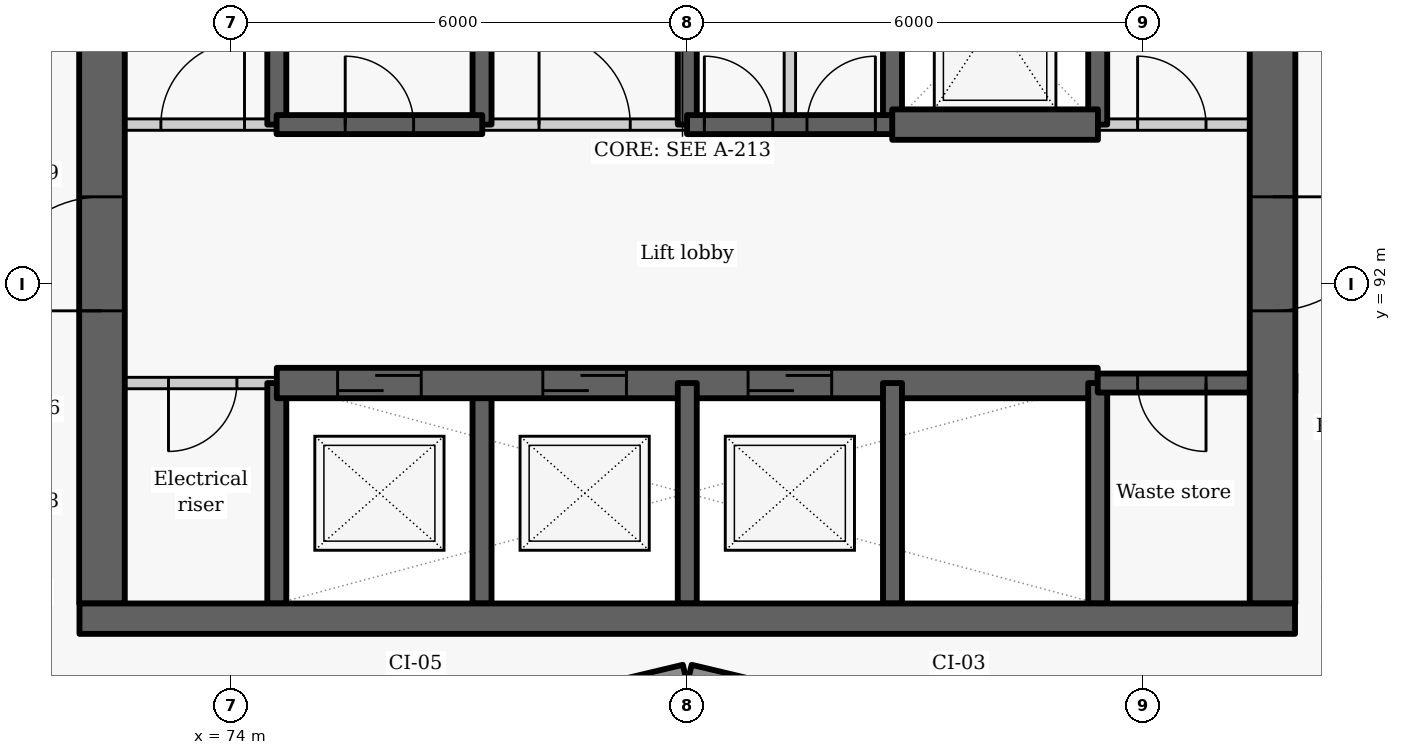
"""IFC4 building model, lengths in metres.
Left out: names, types, materials, properties, quantities, classifications, styles, units other than length and angle.
Written with IfcOpenShell. Run it as: python <this file> out.ifc"""

import sys

from ifc_helpers import new_model, si_unit, direction, frame, frame_2d, origin, place, context, subcontext, project, spatial, rectangle, extrude, element, fill, save


model = new_model("IFC4")
c1 = context("Model", 3, precision=1e-05, world=origin(), true_north=direction((0.0, 1.0)))
c2 = subcontext(c1, "Body", "Model", "MODEL_VIEW")
j1 = project(units=[si_unit("LENGTHUNIT", "METRE"), si_unit("PLANEANGLEUNIT", "RADIAN")], contexts=[c1])
p1 = place(None, origin())
s1 = spatial("IfcSite", under=j1, at=p1, CompositionType="ELEMENT")
p2 = place(p1, origin())
s2 = spatial("IfcBuilding", under=s1, at=p2, CompositionType="ELEMENT")
p3 = place(p2, frame((0.0, 0.0, 61.2)))
s3 = spatial("IfcBuildingStorey", under=s2, at=p3, CompositionType="ELEMENT", Elevation=61.2)
for number, where, z_axis, x_axis in (
    (1, (76.814, 86.119, 0.0), (0.0, 0.0, 1.0), (0.973, 0.232, 0.0)),
    (2, (80.029, 86.872, 0.0), (0.0, 0.0, 1.0), (0.973, -0.232, 0.0)),
):
    element("IfcWall", number, at=place(p3, frame(where, z_axis=z_axis, x_axis=x_axis)), inside=s3, PredefinedType="SOLIDWALL", context=c2, shape_type="SweptSolid", body=[
        extrude(rectangle(XDim=3.246, YDim=0.25, at=frame_2d((1.623, 0.0))), origin(), (0.0, 0.0, 1.0), 2.425),
    ])
p4 = place(p3, frame((74.6, 87.8, -0.275), z_axis=(0.0, 0.0, 1.0), x_axis=(0.0, 1.0, 0.0)))
e3 = element("IfcWall", 3, at=p4, inside=s3, PredefinedType="SHEAR", context=c2, shape_type="SweptSolid", body=[
    extrude(rectangle(XDim=2.9, YDim=0.25, at=frame_2d((1.45, 0.0))), origin(), (0.0, 0.0, 1.0), 3.3),
])
p5 = place(p3, frame((74.6, 94.1, -0.275), z_axis=(0.0, 0.0, 1.0), x_axis=(0.0, 1.0, 0.0)))
e4 = element("IfcWall", 4, at=p5, inside=s3, PredefinedType="SHEAR", context=c2, shape_type="SweptSolid", body=[
    extrude(rectangle(XDim=2.8, YDim=0.25, at=frame_2d((1.4, 0.0))), origin(), (0.0, 0.0, 1.0), 3.3),
])
p6 = place(p3, frame((74.6, 90.7, 0.0), z_axis=(0.0, 0.0, 1.0), x_axis=(-1.0, 0.0, 0.0)))
e5 = element("IfcWall", 5, at=p6, inside=s3, PredefinedType="PARTITIONING", context=c2, shape_type="SweptSolid", body=[
    extrude(rectangle(XDim=2.6, YDim=0.15, at=frame_2d((1.3, 0.0))), origin(), (0.0, 0.0, 1.0), 3.025),
])
p7 = place(p6, frame((0.525, 0.0, 0.0)))
e6 = element("IfcOpeningElement", 6, at=p7, cuts=e5, PredefinedType="OPENING", context=c2, shape_type="SweptSolid", body=[
    extrude(rectangle(XDim=0.9, YDim=2.1, at=frame_2d((0.45, 1.05))), frame((0.0, 0.085, 0.0), z_axis=(0.0, -1.0, 0.0), x_axis=(1.0, 0.0, 0.0)), (0.0, 0.0, 1.0), 0.17),
])
p8 = place(p3, frame((72.3, 87.8, -0.275), z_axis=(0.0, 0.0, 1.0), x_axis=(0.0, 1.0, 0.0)))
e7 = element("IfcWall", 7, at=p8, inside=s3, PredefinedType="SHEAR", context=c2, shape_type="SweptSolid", body=[
    extrude(rectangle(XDim=9.1, YDim=0.6, at=frame_2d((4.55, 0.0))), origin(), (0.0, 0.0, 1.0), 3.3),
])
p9 = place(p8, frame((3.85, 0.0, 0.275)))
e8 = element("IfcOpeningElement", 8, at=p9, cuts=e7, PredefinedType="OPENING", context=c2, shape_type="SweptSolid", body=[
    extrude(rectangle(XDim=1.5, YDim=2.1, at=frame_2d((0.75, 1.05))), frame((0.0, 0.31, 0.0), z_axis=(0.0, -1.0, 0.0), x_axis=(1.0, 0.0, 0.0)), (0.0, 0.0, 1.0), 0.62),
])
p10 = place(p3, frame((77.3, 87.8, -0.275), z_axis=(0.0, 0.0, 1.0), x_axis=(0.0, 1.0, 0.0)))
e9 = element("IfcWall", 9, at=p10, inside=s3, PredefinedType="SHEAR", context=c2, shape_type="SweptSolid", body=[
    extrude(rectangle(XDim=2.9, YDim=0.25, at=frame_2d((1.45, 0.0))), origin(), (0.0, 0.0, 1.0), 3.3),
])
p11 = place(p3, frame((77.3, 94.1, -0.275), z_axis=(0.0, 0.0, 1.0), x_axis=(0.0, 1.0, 0.0)))
e10 = element("IfcWall", 10, at=p11, inside=s3, PredefinedType="SHEAR", context=c2, shape_type="SweptSolid", body=[
    extrude(rectangle(XDim=2.8, YDim=0.25, at=frame_2d((1.4, 0.0))), origin(), (0.0, 0.0, 1.0), 3.3),
])
p12 = place(p3, frame((74.6, 90.7, -0.275), z_axis=(0.0, 0.0, 1.0), x_axis=(1.0, 0.0, 0.0)))
e11 = element("IfcWall", 11, at=p12, inside=s3, PredefinedType="SHEAR", context=c2, shape_type="SweptSolid", body=[
    extrude(rectangle(XDim=10.8, YDim=0.4, at=frame_2d((5.4, 0.0))), origin(), (0.0, 0.0, 1.0), 3.3),
])
p13 = place(p12, frame((0.8, 0.0, 0.275)))
e12 = element("IfcOpeningElement", 12, at=p13, cuts=e11, PredefinedType="OPENING", context=c2, shape_type="SweptSolid", body=[
    extrude(rectangle(XDim=1.1, YDim=2.1, at=frame_2d((0.55, 1.05))), frame((0.0, 0.21, 0.0), z_axis=(0.0, -1.0, 0.0), x_axis=(1.0, 0.0, 0.0)), (0.0, 0.0, 1.0), 0.42),
])
p14 = place(p12, frame((3.5, 0.0, 0.275)))
e13 = element("IfcOpeningElement", 13, at=p14, cuts=e11, PredefinedType="OPENING", context=c2, shape_type="SweptSolid", body=[
    extrude(rectangle(XDim=1.1, YDim=2.1, at=frame_2d((0.55, 1.05))), frame((0.0, 0.21, 0.0), z_axis=(0.0, -1.0, 0.0), x_axis=(1.0, 0.0, 0.0)), (0.0, 0.0, 1.0), 0.42),
])
p15 = place(p12, frame((6.2, 0.0, 0.275)))
e14 = element("IfcOpeningElement", 14, at=p15, cuts=e11, PredefinedType="OPENING", context=c2, shape_type="SweptSolid", body=[
    extrude(rectangle(XDim=1.1, YDim=2.1, at=frame_2d((0.55, 1.05))), frame((0.0, 0.21, 0.0), z_axis=(0.0, -1.0, 0.0), x_axis=(1.0, 0.0, 0.0)), (0.0, 0.0, 1.0), 0.42),
])
p16 = place(p3, frame((80.0, 87.8, -0.275), z_axis=(0.0, 0.0, 1.0), x_axis=(0.0, 1.0, 0.0)))
e15 = element("IfcWall", 15, at=p16, inside=s3, PredefinedType="SHEAR", context=c2, shape_type="SweptSolid", body=[
    extrude(rectangle(XDim=2.9, YDim=0.25, at=frame_2d((1.45, 0.0))), origin(), (0.0, 0.0, 1.0), 3.3),
])
p17 = place(p3, frame((80.0, 94.1, -0.275), z_axis=(0.0, 0.0, 1.0), x_axis=(0.0, 1.0, 0.0)))
e16 = element("IfcWall", 16, at=p17, inside=s3, PredefinedType="SHEAR", context=c2, shape_type="SweptSolid", body=[
    extrude(rectangle(XDim=2.8, YDim=0.25, at=frame_2d((1.4, 0.0))), origin(), (0.0, 0.0, 1.0), 3.3),
])
p18 = place(p3, frame((82.7, 87.8, -0.275), z_axis=(0.0, 0.0, 1.0), x_axis=(0.0, 1.0, 0.0)))
e17 = element("IfcWall", 17, at=p18, inside=s3, PredefinedType="SHEAR", context=c2, shape_type="SweptSolid", body=[
    extrude(rectangle(XDim=2.9, YDim=0.25, at=frame_2d((1.45, 0.0))), origin(), (0.0, 0.0, 1.0), 3.3),
])
p19 = place(p3, frame((82.7, 94.1, -0.275), z_axis=(0.0, 0.0, 1.0), x_axis=(0.0, 1.0, 0.0)))
e18 = element("IfcWall", 18, at=p19, inside=s3, PredefinedType="SHEAR", context=c2, shape_type="SweptSolid", body=[
    extrude(rectangle(XDim=2.8, YDim=0.25, at=frame_2d((1.4, 0.0))), origin(), (0.0, 0.0, 1.0), 3.3),
])
p20 = place(p3, frame((85.4, 87.8, -0.275), z_axis=(0.0, 0.0, 1.0), x_axis=(0.0, 1.0, 0.0)))
e19 = element("IfcWall", 19, at=p20, inside=s3, PredefinedType="SHEAR", context=c2, shape_type="SweptSolid", body=[
    extrude(rectangle(XDim=2.9, YDim=0.25, at=frame_2d((1.45, 0.0))), origin(), (0.0, 0.0, 1.0), 3.3),
])
p21 = place(p3, frame((85.4, 94.1, -0.275), z_axis=(0.0, 0.0, 1.0), x_axis=(0.0, 1.0, 0.0)))
e20 = element("IfcWall", 20, at=p21, inside=s3, PredefinedType="SHEAR", context=c2, shape_type="SweptSolid", body=[
    extrude(rectangle(XDim=2.8, YDim=0.25, at=frame_2d((1.4, 0.0))), origin(), (0.0, 0.0, 1.0), 3.3),
])
p22 = place(p3, frame((88.0, 90.7, -0.275), z_axis=(0.0, 0.0, 1.0), x_axis=(-1.0, 0.0, 0.0)))
e21 = element("IfcWall", 21, at=p22, inside=s3, PredefinedType="SHEAR", context=c2, shape_type="SweptSolid", body=[
    extrude(rectangle(XDim=2.6, YDim=0.25, at=frame_2d((1.3, 0.0))), origin(), (0.0, 0.0, 1.0), 3.3),
])
p23 = place(p22, frame((1.175, 0.0, 0.275)))
e22 = element("IfcOpeningElement", 22, at=p23, cuts=e21, PredefinedType="OPENING", context=c2, shape_type="SweptSolid", body=[
    extrude(rectangle(XDim=0.9, YDim=2.1, at=frame_2d((0.45, 1.05))), frame((0.0, 0.135, 0.0), z_axis=(0.0, -1.0, 0.0), x_axis=(1.0, 0.0, 0.0)), (0.0, 0.0, 1.0), 0.27),
])
p24 = place(p3, frame((87.7, 103.4, -0.275), z_axis=(0.0, 0.0, 1.0), x_axis=(0.0, -1.0, 0.0)))
e23 = element("IfcWall", 23, at=p24, inside=s3, PredefinedType="SHEAR", context=c2, shape_type="SweptSolid", body=[
    extrude(rectangle(XDim=15.6, YDim=0.6, at=frame_2d((7.8, 0.0))), origin(), (0.0, 0.0, 1.0), 3.3),
])
p25 = place(p24, frame((10.25, 0.0, 0.275)))
e24 = element("IfcOpeningElement", 24, at=p25, cuts=e23, PredefinedType="OPENING", context=c2, shape_type="SweptSolid", body=[
    extrude(rectangle(XDim=1.5, YDim=2.1, at=frame_2d((0.75, 1.05))), frame((0.0, 0.31, 0.0), z_axis=(0.0, -1.0, 0.0), x_axis=(1.0, 0.0, 0.0)), (0.0, 0.0, 1.0), 0.62),
])
p26 = place(p24, frame((2.7, 0.0, 0.275)))
e25 = element("IfcOpeningElement", 25, at=p26, cuts=e23, PredefinedType="OPENING", context=c2, shape_type="SweptSolid", body=[
    extrude(rectangle(XDim=1.1, YDim=2.1, at=frame_2d((0.55, 1.05))), frame((0.0, 0.31, 0.0), z_axis=(0.0, -1.0, 0.0), x_axis=(1.0, 0.0, 0.0)), (0.0, 0.0, 1.0), 0.62),
])
p27 = place(p3, frame((72.0, 94.1, 0.0), z_axis=(0.0, 0.0, 1.0), x_axis=(1.0, 0.0, 0.0)))
e26 = element("IfcWall", 26, at=p27, inside=s3, PredefinedType="PARTITIONING", context=c2, shape_type="SweptSolid", body=[
    extrude(rectangle(XDim=2.603, YDim=0.15, at=frame_2d((1.302, 0.0))), origin(), (0.0, 0.0, 1.0), 3.025),
])
p28 = place(p27, frame((1.075, 0.0, 0.0)))
e27 = element("IfcOpeningElement", 27, at=p28, cuts=e26, PredefinedType="OPENING", context=c2, shape_type="SweptSolid", body=[
    extrude(rectangle(XDim=1.1, YDim=2.1, at=frame_2d((0.55, 1.05))), frame((0.0, 0.085, 0.0), z_axis=(0.0, -1.0, 0.0), x_axis=(1.0, 0.0, 0.0)), (0.0, 0.0, 1.0), 0.17),
])
p29 = place(p3, frame((77.297, 94.1, 0.0), z_axis=(0.0, 0.0, 1.0), x_axis=(1.0, 0.0, 0.0)))
e28 = element("IfcWall", 28, at=p29, inside=s3, PredefinedType="PARTITIONING", context=c2, shape_type="SweptSolid", body=[
    extrude(rectangle(XDim=2.706, YDim=0.15, at=frame_2d((1.353, 0.0))), origin(), (0.0, 0.0, 1.0), 3.025),
])
p30 = place(p29, frame((0.753, 0.0, 0.0)))
e29 = element("IfcOpeningElement", 29, at=p30, cuts=e28, PredefinedType="OPENING", context=c2, shape_type="SweptSolid", body=[
    extrude(rectangle(XDim=1.2, YDim=2.1, at=frame_2d((0.6, 1.05))), frame((0.0, 0.085, 0.0), z_axis=(0.0, -1.0, 0.0), x_axis=(1.0, 0.0, 0.0)), (0.0, 0.0, 1.0), 0.17),
])
p31 = place(p3, frame((85.397, 94.1, 0.0), z_axis=(0.0, 0.0, 1.0), x_axis=(1.0, 0.0, 0.0)))
e30 = element("IfcWall", 30, at=p31, inside=s3, PredefinedType="PARTITIONING", context=c2, shape_type="SweptSolid", body=[
    extrude(rectangle(XDim=2.603, YDim=0.15, at=frame_2d((1.302, 0.0))), origin(), (0.0, 0.0, 1.0), 3.025),
])
p32 = place(p31, frame((0.528, 0.0, 0.0)))
e31 = element("IfcOpeningElement", 31, at=p32, cuts=e30, PredefinedType="OPENING", context=c2, shape_type="SweptSolid", body=[
    extrude(rectangle(XDim=0.9, YDim=2.1, at=frame_2d((0.45, 1.05))), frame((0.0, 0.085, 0.0), z_axis=(0.0, -1.0, 0.0), x_axis=(1.0, 0.0, 0.0)), (0.0, 0.0, 1.0), 0.17),
])
p33 = place(p3, frame((74.597, 94.1, -0.275), z_axis=(0.0, 0.0, 1.0), x_axis=(1.0, 0.0, 0.0)))
e32 = element("IfcWall", 32, at=p33, inside=s3, PredefinedType="SHEAR", context=c2, shape_type="SweptSolid", body=[
    extrude(rectangle(XDim=2.706, YDim=0.25, at=frame_2d((1.353, 0.0))), origin(), (0.0, 0.0, 1.0), 3.3),
])
p34 = place(p33, frame((0.903, 0.0, 0.275)))
e33 = element("IfcOpeningElement", 33, at=p34, cuts=e32, PredefinedType="OPENING", context=c2, shape_type="SweptSolid", body=[
    extrude(rectangle(XDim=0.9, YDim=2.1, at=frame_2d((0.45, 1.05))), frame((0.0, 0.135, 0.0), z_axis=(0.0, -1.0, 0.0), x_axis=(1.0, 0.0, 0.0)), (0.0, 0.0, 1.0), 0.27),
])
p35 = place(p3, frame((79.997, 94.1, -0.275), z_axis=(0.0, 0.0, 1.0), x_axis=(1.0, 0.0, 0.0)))
e34 = element("IfcWall", 34, at=p35, inside=s3, PredefinedType="SHEAR", context=c2, shape_type="SweptSolid", body=[
    extrude(rectangle(XDim=2.706, YDim=0.25, at=frame_2d((1.353, 0.0))), origin(), (0.0, 0.0, 1.0), 3.3),
])
p36 = place(p35, frame((0.228, 0.0, 0.275)))
e35 = element("IfcOpeningElement", 35, at=p36, cuts=e34, PredefinedType="OPENING", context=c2, shape_type="SweptSolid", body=[
    extrude(rectangle(XDim=0.9, YDim=2.1, at=frame_2d((0.45, 1.05))), frame((0.0, 0.135, 0.0), z_axis=(0.0, -1.0, 0.0), x_axis=(1.0, 0.0, 0.0)), (0.0, 0.0, 1.0), 0.27),
])
p37 = place(p35, frame((1.578, 0.0, 0.275)))
e36 = element("IfcOpeningElement", 36, at=p37, cuts=e34, PredefinedType="OPENING", context=c2, shape_type="SweptSolid", body=[
    extrude(rectangle(XDim=0.9, YDim=2.1, at=frame_2d((0.45, 1.05))), frame((0.0, 0.135, 0.0), z_axis=(0.0, -1.0, 0.0), x_axis=(1.0, 0.0, 0.0)), (0.0, 0.0, 1.0), 0.27),
])
p38 = place(p3, frame((82.697, 94.1, -0.275), z_axis=(0.0, 0.0, 1.0), x_axis=(1.0, 0.0, 0.0)))
e37 = element("IfcWall", 37, at=p38, inside=s3, PredefinedType="SHEAR", context=c2, shape_type="SweptSolid", body=[
    extrude(rectangle(XDim=2.706, YDim=0.4, at=frame_2d((1.353, 0.0))), origin(), (0.0, 0.0, 1.0), 3.3),
])
p39 = place(p3, frame((81.35, 94.1, 0.0), z_axis=(0.0, 0.0, 1.0), x_axis=(0.0, 1.0, 0.0)))
e38 = element("IfcWall", 38, at=p39, inside=s3, PredefinedType="PARTITIONING", context=c2, shape_type="SweptSolid", body=[
    extrude(rectangle(XDim=2.8, YDim=0.15, at=frame_2d((1.4, 0.0))), origin(), (0.0, 0.0, 1.0), 3.025),
])
p40 = place(p3, frame((72.004, 87.6, -0.275), z_axis=(0.0, 0.0, 1.0), x_axis=(1.0, 0.0, 0.0)))
e39 = element("IfcWall", 39, at=p40, inside=s3, PredefinedType="SHEAR", context=c2, shape_type="SweptSolid", body=[
    extrude(rectangle(XDim=15.992, YDim=0.4, at=frame_2d((7.996, 0.0))), origin(), (0.0, 0.0, 1.0), 3.3),
])
p41 = place(p7, origin())
e40 = element("IfcDoor", 40, at=p41, inside=s3, OperationType="SINGLE_SWING_RIGHT", PredefinedType="DOOR", context=c2, shape_type="SweptSolid", body=[
    extrude(rectangle(XDim=0.9, YDim=2.1, at=frame_2d((0.45, 1.05))), frame((0.0, 0.025, 0.0), z_axis=(0.0, -1.0, 0.0), x_axis=(1.0, 0.0, 0.0)), (0.0, 0.0, 1.0), 0.05),
])
fill(e6, e40)
p42 = place(p13, origin())
e41 = element("IfcDoor", 41, at=p42, inside=s3, OperationType="SLIDING_TO_LEFT", PredefinedType="DOOR", context=c2, shape_type="SweptSolid", body=[
    extrude(rectangle(XDim=1.1, YDim=2.1, at=frame_2d((0.55, 1.05))), frame((0.0, 0.025, 0.0), z_axis=(0.0, -1.0, 0.0), x_axis=(1.0, 0.0, 0.0)), (0.0, 0.0, 1.0), 0.05),
])
fill(e12, e41)
p43 = place(p14, origin())
e42 = element("IfcDoor", 42, at=p43, inside=s3, OperationType="SLIDING_TO_LEFT", PredefinedType="DOOR", context=c2, shape_type="SweptSolid", body=[
    extrude(rectangle(XDim=1.1, YDim=2.1, at=frame_2d((0.55, 1.05))), frame((0.0, 0.025, 0.0), z_axis=(0.0, -1.0, 0.0), x_axis=(1.0, 0.0, 0.0)), (0.0, 0.0, 1.0), 0.05),
])
fill(e13, e42)
p44 = place(p15, origin())
e43 = element("IfcDoor", 43, at=p44, inside=s3, OperationType="SLIDING_TO_LEFT", PredefinedType="DOOR", context=c2, shape_type="SweptSolid", body=[
    extrude(rectangle(XDim=1.1, YDim=2.1, at=frame_2d((0.55, 1.05))), frame((0.0, 0.025, 0.0), z_axis=(0.0, -1.0, 0.0), x_axis=(1.0, 0.0, 0.0)), (0.0, 0.0, 1.0), 0.05),
])
fill(e14, e43)
p45 = place(p23, origin())
e44 = element("IfcDoor", 44, at=p45, inside=s3, OperationType="SINGLE_SWING_LEFT", PredefinedType="DOOR", context=c2, shape_type="SweptSolid", body=[
    extrude(rectangle(XDim=0.9, YDim=2.1, at=frame_2d((0.45, 1.05))), frame((0.0, 0.025, 0.0), z_axis=(0.0, -1.0, 0.0), x_axis=(1.0, 0.0, 0.0)), (0.0, 0.0, 1.0), 0.05),
])
fill(e22, e44)
p46 = place(p28, origin())
e45 = element("IfcDoor", 45, at=p46, inside=s3, OperationType="SINGLE_SWING_RIGHT", PredefinedType="DOOR", context=c2, shape_type="SweptSolid", body=[
    extrude(rectangle(XDim=1.1, YDim=2.1, at=frame_2d((0.55, 1.05))), frame((0.0, 0.025, 0.0), z_axis=(0.0, -1.0, 0.0), x_axis=(1.0, 0.0, 0.0)), (0.0, 0.0, 1.0), 0.05),
])
fill(e27, e45)
p47 = place(p34, origin())
e46 = element("IfcDoor", 46, at=p47, inside=s3, OperationType="SINGLE_SWING_LEFT", PredefinedType="DOOR", context=c2, shape_type="SweptSolid", body=[
    extrude(rectangle(XDim=0.9, YDim=2.1, at=frame_2d((0.45, 1.05))), frame((0.0, 0.025, 0.0), z_axis=(0.0, -1.0, 0.0), x_axis=(1.0, 0.0, 0.0)), (0.0, 0.0, 1.0), 0.05),
])
fill(e33, e46)
p48 = place(p30, origin())
e47 = element("IfcDoor", 47, at=p48, inside=s3, OperationType="DOUBLE_DOOR_SINGLE_SWING", PredefinedType="DOOR", context=c2, shape_type="SweptSolid", body=[
    extrude(rectangle(XDim=1.2, YDim=2.1, at=frame_2d((0.6, 1.05))), frame((0.0, 0.025, 0.0), z_axis=(0.0, -1.0, 0.0), x_axis=(1.0, 0.0, 0.0)), (0.0, 0.0, 1.0), 0.05),
])
fill(e29, e47)
p49 = place(p36, origin())
e48 = element("IfcDoor", 48, at=p49, inside=s3, OperationType="SINGLE_SWING_LEFT", PredefinedType="DOOR", context=c2, shape_type="SweptSolid", body=[
    extrude(rectangle(XDim=0.9, YDim=2.1, at=frame_2d((0.45, 1.05))), frame((0.0, 0.025, 0.0), z_axis=(0.0, -1.0, 0.0), x_axis=(1.0, 0.0, 0.0)), (0.0, 0.0, 1.0), 0.05),
])
fill(e35, e48)
p50 = place(p37, origin())
e49 = element("IfcDoor", 49, at=p50, inside=s3, OperationType="SINGLE_SWING_RIGHT", PredefinedType="DOOR", context=c2, shape_type="SweptSolid", body=[
    extrude(rectangle(XDim=0.9, YDim=2.1, at=frame_2d((0.45, 1.05))), frame((0.0, 0.025, 0.0), z_axis=(0.0, -1.0, 0.0), x_axis=(1.0, 0.0, 0.0)), (0.0, 0.0, 1.0), 0.05),
])
fill(e36, e49)
p51 = place(p32, origin())
e50 = element("IfcDoor", 50, at=p51, inside=s3, OperationType="SINGLE_SWING_LEFT", PredefinedType="DOOR", context=c2, shape_type="SweptSolid", body=[
    extrude(rectangle(XDim=0.9, YDim=2.1, at=frame_2d((0.45, 1.05))), frame((0.0, 0.025, 0.0), z_axis=(0.0, -1.0, 0.0), x_axis=(1.0, 0.0, 0.0)), (0.0, 0.0, 1.0), 0.05),
])
fill(e31, e50)
p52 = place(p25, origin())
e51 = element("IfcDoor", 51, at=p52, inside=s3, OperationType="DOUBLE_DOOR_SINGLE_SWING", PredefinedType="DOOR", context=c2, shape_type="SweptSolid", body=[
    extrude(rectangle(XDim=1.5, YDim=2.1, at=frame_2d((0.75, 1.05))), frame((0.0, 0.025, 0.0), z_axis=(0.0, -1.0, 0.0), x_axis=(1.0, 0.0, 0.0)), (0.0, 0.0, 1.0), 0.05),
])
fill(e24, e51)
p53 = place(p9, origin())
e52 = element("IfcDoor", 52, at=p53, inside=s3, OperationType="DOUBLE_DOOR_SINGLE_SWING", PredefinedType="DOOR", context=c2, shape_type="SweptSolid", body=[
    extrude(rectangle(XDim=1.5, YDim=2.1, at=frame_2d((0.75, 1.05))), frame((0.0, 0.025, 0.0), z_axis=(0.0, -1.0, 0.0), x_axis=(1.0, 0.0, 0.0)), (0.0, 0.0, 1.0), 0.05),
])
fill(e8, e52)
save(model, sys.argv[1])
